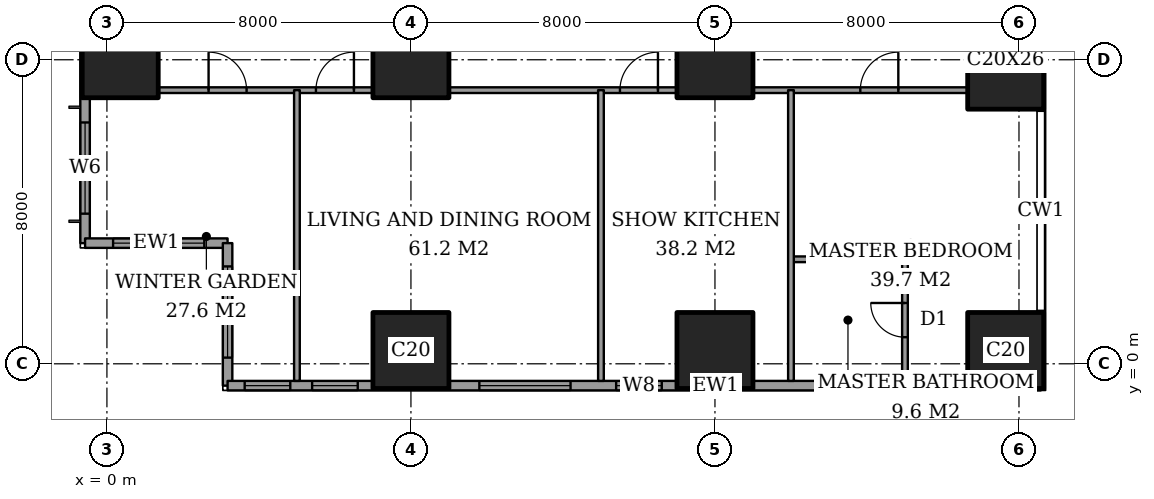
"""IFC4 building model, lengths in metres.
Left out: names, types, materials, properties, quantities, classifications, styles, units other than length and angle.
Written with IfcOpenShell. Run it as: python <this file> out.ifc"""

import sys

from ifc_helpers import new_model, si_unit, direction, frame, frame_2d, origin, origin_2d, place, context, subcontext, project, spatial, rectangle, extrude, element, fill, save


model = new_model("IFC4")
c1 = context("Model", 3, precision=1e-05, world=origin(), true_north=direction((0.0, 1.0)))
c2 = subcontext(c1, "Body", "Model", "MODEL_VIEW")
j1 = project(units=[si_unit("LENGTHUNIT", "METRE"), si_unit("PLANEANGLEUNIT", "RADIAN")], contexts=[c1])
p1 = place(None, origin())
s1 = spatial("IfcSite", under=j1, at=p1, CompositionType="ELEMENT")
p2 = place(p1, origin())
s2 = spatial("IfcBuilding", under=s1, at=p2, CompositionType="ELEMENT")
p3 = place(p2, frame((0.0, 0.0, 58.4)))
s3 = spatial("IfcBuildingStorey", under=s2, at=p3, CompositionType="ELEMENT", Elevation=58.4)
for number, where, z_axis, x_axis in (
    (1, (0.35, 8.0, 0.0), (0.0, 0.0, 1.0), (1.0, 0.0, 0.0)),
    (2, (8.0, 0.35, 0.0), (0.0, 0.0, 1.0), (1.0, 0.0, 0.0)),
    (3, (8.0, 8.0, 0.0), (0.0, 0.0, 1.0), (1.0, 0.0, 0.0)),
    (4, (16.0, 0.35, 0.0), (0.0, 0.0, 1.0), (1.0, 0.0, 0.0)),
    (5, (16.0, 8.0, 0.0), (0.0, 0.0, 1.0), (1.0, 0.0, 0.0)),
    (6, (23.65, 0.35, 0.0), (0.0, 0.0, 1.0), (1.0, 0.0, 0.0)),
):
    element("IfcColumn", number, at=place(p3, frame(where, z_axis=z_axis, x_axis=x_axis)), inside=s3, PredefinedType="COLUMN", context=c2, shape_type="SweptSolid", body=[
        extrude(rectangle(XDim=2.0, YDim=2.0, at=origin_2d()), origin(), (0.0, 0.0, 1.0), 3.6),
    ])
p4 = place(p3, frame((23.65, 8.0, 0.0), z_axis=(0.0, 0.0, 1.0), x_axis=(1.0, 0.0, 0.0)))
e7 = element("IfcColumn", 7, at=p4, inside=s3, PredefinedType="COLUMN", context=c2, shape_type="SweptSolid", body=[
    extrude(rectangle(XDim=2.0, YDim=2.6, at=origin_2d()), origin(), (0.0, 0.0, 1.0), 3.6),
])
p5 = place(p3, frame((-0.575, 44.825, 0.0), z_axis=(0.0, 0.0, 1.0), x_axis=(0.0, -1.0, 0.0)))
e8 = element("IfcWall", 8, at=p5, inside=s3, PredefinedType="SOLIDWALL", context=c2, shape_type="SweptSolid", body=[
    extrude(rectangle(XDim=41.65, YDim=0.25, at=frame_2d((20.825, 0.0))), origin(), (0.0, 0.0, 1.0), 3.6),
])
p6 = place(p5, frame((0.775, 0.0, 0.6)))
e9 = element("IfcOpeningElement", 9, at=p6, cuts=e8, PredefinedType="OPENING", context=c2, shape_type="SweptSolid", body=[
    extrude(rectangle(XDim=2.4, YDim=2.0, at=frame_2d((1.2, 1.0))), frame((0.0, 0.135, 0.0), z_axis=(0.0, -1.0, 0.0), x_axis=(1.0, 0.0, 0.0)), (0.0, 0.0, 1.0), 0.27),
])
p7 = place(p5, frame((6.1, 0.0, 0.6)))
e10 = element("IfcOpeningElement", 10, at=p7, cuts=e8, PredefinedType="OPENING", context=c2, shape_type="SweptSolid", body=[
    extrude(rectangle(XDim=1.2, YDim=2.0, at=frame_2d((0.6, 1.0))), frame((0.0, 0.135, 0.0), z_axis=(0.0, -1.0, 0.0), x_axis=(1.0, 0.0, 0.0)), (0.0, 0.0, 1.0), 0.27),
])
p8 = place(p5, frame((8.425, 0.0, 0.6)))
e11 = element("IfcOpeningElement", 11, at=p8, cuts=e8, PredefinedType="OPENING", context=c2, shape_type="SweptSolid", body=[
    extrude(rectangle(XDim=2.4, YDim=2.0, at=frame_2d((1.2, 1.0))), frame((0.0, 0.135, 0.0), z_axis=(0.0, -1.0, 0.0), x_axis=(1.0, 0.0, 0.0)), (0.0, 0.0, 1.0), 0.27),
])
p9 = place(p5, frame((15.625, 0.0, 0.6)))
e12 = element("IfcOpeningElement", 12, at=p9, cuts=e8, PredefinedType="OPENING", context=c2, shape_type="SweptSolid", body=[
    extrude(rectangle(XDim=2.4, YDim=2.0, at=frame_2d((1.2, 1.0))), frame((0.0, 0.135, 0.0), z_axis=(0.0, -1.0, 0.0), x_axis=(1.0, 0.0, 0.0)), (0.0, 0.0, 1.0), 0.27),
])
p10 = place(p5, frame((23.625, 0.0, 0.6)))
e13 = element("IfcOpeningElement", 13, at=p10, cuts=e8, PredefinedType="OPENING", context=c2, shape_type="SweptSolid", body=[
    extrude(rectangle(XDim=2.4, YDim=2.0, at=frame_2d((1.2, 1.0))), frame((0.0, 0.135, 0.0), z_axis=(0.0, -1.0, 0.0), x_axis=(1.0, 0.0, 0.0)), (0.0, 0.0, 1.0), 0.27),
])
p11 = place(p5, frame((30.825, 0.0, 0.6)))
e14 = element("IfcOpeningElement", 14, at=p11, cuts=e8, PredefinedType="OPENING", context=c2, shape_type="SweptSolid", body=[
    extrude(rectangle(XDim=2.4, YDim=2.0, at=frame_2d((1.2, 1.0))), frame((0.0, 0.135, 0.0), z_axis=(0.0, -1.0, 0.0), x_axis=(1.0, 0.0, 0.0)), (0.0, 0.0, 1.0), 0.27),
])
p12 = place(p5, frame((34.5, 0.0, 0.6)))
e15 = element("IfcOpeningElement", 15, at=p12, cuts=e8, PredefinedType="OPENING", context=c2, shape_type="SweptSolid", body=[
    extrude(rectangle(XDim=1.2, YDim=2.0, at=frame_2d((0.6, 1.0))), frame((0.0, 0.135, 0.0), z_axis=(0.0, -1.0, 0.0), x_axis=(1.0, 0.0, 0.0)), (0.0, 0.0, 1.0), 0.27),
])
p13 = place(p5, frame((38.475, 0.0, 0.6)))
e16 = element("IfcOpeningElement", 16, at=p13, cuts=e8, PredefinedType="OPENING", context=c2, shape_type="SweptSolid", body=[
    extrude(rectangle(XDim=2.4, YDim=2.0, at=frame_2d((1.2, 1.0))), frame((0.0, 0.135, 0.0), z_axis=(0.0, -1.0, 0.0), x_axis=(1.0, 0.0, 0.0)), (0.0, 0.0, 1.0), 0.27),
])
p14 = place(p3, frame((-0.575, 3.175, 0.0), z_axis=(0.0, 0.0, 1.0), x_axis=(1.0, 0.0, 0.0)))
e17 = element("IfcWall", 17, at=p14, inside=s3, PredefinedType="SOLIDWALL", context=c2, shape_type="SweptSolid", body=[
    extrude(rectangle(XDim=3.75, YDim=0.25, at=frame_2d((1.875, 0.0))), origin(), (0.0, 0.0, 1.0), 3.6),
])
p15 = place(p14, frame((0.738, 0.0, 0.6)))
e18 = element("IfcOpeningElement", 18, at=p15, cuts=e17, PredefinedType="OPENING", context=c2, shape_type="SweptSolid", body=[
    extrude(rectangle(XDim=2.4, YDim=2.0, at=frame_2d((1.2, 1.0))), frame((0.0, 0.135, 0.0), z_axis=(0.0, -1.0, 0.0), x_axis=(1.0, 0.0, 0.0)), (0.0, 0.0, 1.0), 0.27),
])
p16 = place(p3, frame((3.175, 3.175, 0.0), z_axis=(0.0, 0.0, 1.0), x_axis=(0.0, -1.0, 0.0)))
e19 = element("IfcWall", 19, at=p16, inside=s3, PredefinedType="SOLIDWALL", context=c2, shape_type="SweptSolid", body=[
    extrude(rectangle(XDim=3.75, YDim=0.25, at=frame_2d((1.875, 0.0))), origin(), (0.0, 0.0, 1.0), 3.6),
])
p17 = place(p16, frame((0.613, 0.0, 0.6)))
e20 = element("IfcOpeningElement", 20, at=p17, cuts=e19, PredefinedType="OPENING", context=c2, shape_type="SweptSolid", body=[
    extrude(rectangle(XDim=2.4, YDim=2.0, at=frame_2d((1.2, 1.0))), frame((0.0, 0.135, 0.0), z_axis=(0.0, -1.0, 0.0), x_axis=(1.0, 0.0, 0.0)), (0.0, 0.0, 1.0), 0.27),
])
p18 = place(p3, frame((3.175, -0.575, 0.0), z_axis=(0.0, 0.0, 1.0), x_axis=(1.0, 0.0, 0.0)))
e21 = element("IfcWall", 21, at=p18, inside=s3, PredefinedType="SOLIDWALL", context=c2, shape_type="SweptSolid", body=[
    extrude(rectangle(XDim=21.4, YDim=0.25, at=frame_2d((10.7, 0.0))), origin(), (0.0, 0.0, 1.0), 3.6),
])
p19 = place(p18, frame((0.45, 0.0, 0.6)))
e22 = element("IfcOpeningElement", 22, at=p19, cuts=e21, PredefinedType="OPENING", context=c2, shape_type="SweptSolid", body=[
    extrude(rectangle(XDim=1.2, YDim=2.0, at=frame_2d((0.6, 1.0))), frame((0.0, 0.135, 0.0), z_axis=(0.0, -1.0, 0.0), x_axis=(1.0, 0.0, 0.0)), (0.0, 0.0, 1.0), 0.27),
])
p20 = place(p18, frame((2.225, 0.0, 0.6)))
e23 = element("IfcOpeningElement", 23, at=p20, cuts=e21, PredefinedType="OPENING", context=c2, shape_type="SweptSolid", body=[
    extrude(rectangle(XDim=1.2, YDim=2.0, at=frame_2d((0.6, 1.0))), frame((0.0, 0.135, 0.0), z_axis=(0.0, -1.0, 0.0), x_axis=(1.0, 0.0, 0.0)), (0.0, 0.0, 1.0), 0.27),
])
p21 = place(p18, frame((6.625, 0.0, 0.6)))
e24 = element("IfcOpeningElement", 24, at=p21, cuts=e21, PredefinedType="OPENING", context=c2, shape_type="SweptSolid", body=[
    extrude(rectangle(XDim=2.4, YDim=2.0, at=frame_2d((1.2, 1.0))), frame((0.0, 0.135, 0.0), z_axis=(0.0, -1.0, 0.0), x_axis=(1.0, 0.0, 0.0)), (0.0, 0.0, 1.0), 0.27),
])
p22 = place(p18, frame((10.225, 0.0, 0.6)))
e25 = element("IfcOpeningElement", 25, at=p22, cuts=e21, PredefinedType="OPENING", context=c2, shape_type="SweptSolid", body=[
    extrude(rectangle(XDim=1.2, YDim=2.0, at=frame_2d((0.6, 1.0))), frame((0.0, 0.135, 0.0), z_axis=(0.0, -1.0, 0.0), x_axis=(1.0, 0.0, 0.0)), (0.0, 0.0, 1.0), 0.27),
])
p23 = place(p18, frame((15.725, 0.0, 0.6)))
e26 = element("IfcOpeningElement", 26, at=p23, cuts=e21, PredefinedType="OPENING", context=c2, shape_type="SweptSolid", body=[
    extrude(rectangle(XDim=1.2, YDim=2.0, at=frame_2d((0.6, 1.0))), frame((0.0, 0.135, 0.0), z_axis=(0.0, -1.0, 0.0), x_axis=(1.0, 0.0, 0.0)), (0.0, 0.0, 1.0), 0.27),
])
p24 = place(p18, frame((18.125, 0.0, 0.6)))
e27 = element("IfcOpeningElement", 27, at=p24, cuts=e21, PredefinedType="OPENING", context=c2, shape_type="SweptSolid", body=[
    extrude(rectangle(XDim=1.2, YDim=2.0, at=frame_2d((0.6, 1.0))), frame((0.0, 0.135, 0.0), z_axis=(0.0, -1.0, 0.0), x_axis=(1.0, 0.0, 0.0)), (0.0, 0.0, 1.0), 0.27),
])
p25 = place(p3, frame((18.0, 2.75, 0.0), z_axis=(0.0, 0.0, 1.0), x_axis=(1.0, 0.0, 0.0)))
e28 = element("IfcWall", 28, at=p25, inside=s3, PredefinedType="PARTITIONING", context=c2, shape_type="SweptSolid", body=[
    extrude(rectangle(XDim=3.0, YDim=0.15, at=frame_2d((1.5, 0.0))), origin(), (0.0, 0.0, 1.0), 3.35),
])
p26 = place(p3, frame((1.35, 7.2, 0.0), z_axis=(0.0, 0.0, 1.0), x_axis=(1.0, 0.0, 0.0)))
e29 = element("IfcWall", 29, at=p26, inside=s3, PredefinedType="PARTITIONING", context=c2, shape_type="SweptSolid", body=[
    extrude(rectangle(XDim=5.65, YDim=0.15, at=frame_2d((2.825, 0.0))), origin(), (0.0, 0.0, 1.0), 3.35),
])
p27 = place(p26, frame((1.325, 0.0, 0.0)))
e30 = element("IfcOpeningElement", 30, at=p27, cuts=e29, PredefinedType="OPENING", context=c2, shape_type="SweptSolid", body=[
    extrude(rectangle(XDim=1.0, YDim=2.1, at=frame_2d((0.5, 1.05))), frame((0.0, 0.085, 0.0), z_axis=(0.0, -1.0, 0.0), x_axis=(1.0, 0.0, 0.0)), (0.0, 0.0, 1.0), 0.17),
])
p28 = place(p26, frame((4.15, 0.0, 0.0)))
e31 = element("IfcOpeningElement", 31, at=p28, cuts=e29, PredefinedType="OPENING", context=c2, shape_type="SweptSolid", body=[
    extrude(rectangle(XDim=1.0, YDim=2.1, at=frame_2d((0.5, 1.05))), frame((0.0, 0.085, 0.0), z_axis=(0.0, -1.0, 0.0), x_axis=(1.0, 0.0, 0.0)), (0.0, 0.0, 1.0), 0.17),
])
p29 = place(p3, frame((9.0, 7.2, 0.0), z_axis=(0.0, 0.0, 1.0), x_axis=(1.0, 0.0, 0.0)))
e32 = element("IfcWall", 32, at=p29, inside=s3, PredefinedType="PARTITIONING", context=c2, shape_type="SweptSolid", body=[
    extrude(rectangle(XDim=6.0, YDim=0.15, at=frame_2d((3.0, 0.0))), origin(), (0.0, 0.0, 1.0), 3.35),
])
p30 = place(p29, frame((4.5, 0.0, 0.0)))
e33 = element("IfcOpeningElement", 33, at=p30, cuts=e32, PredefinedType="OPENING", context=c2, shape_type="SweptSolid", body=[
    extrude(rectangle(XDim=1.0, YDim=2.1, at=frame_2d((0.5, 1.05))), frame((0.0, 0.085, 0.0), z_axis=(0.0, -1.0, 0.0), x_axis=(1.0, 0.0, 0.0)), (0.0, 0.0, 1.0), 0.17),
])
p31 = place(p3, frame((17.0, 7.2, 0.0), z_axis=(0.0, 0.0, 1.0), x_axis=(1.0, 0.0, 0.0)))
e34 = element("IfcWall", 34, at=p31, inside=s3, PredefinedType="PARTITIONING", context=c2, shape_type="SweptSolid", body=[
    extrude(rectangle(XDim=5.65, YDim=0.15, at=frame_2d((2.825, 0.0))), origin(), (0.0, 0.0, 1.0), 3.35),
])
p32 = place(p31, frame((2.825, 0.0, 0.0)))
e35 = element("IfcOpeningElement", 35, at=p32, cuts=e34, PredefinedType="OPENING", context=c2, shape_type="SweptSolid", body=[
    extrude(rectangle(XDim=1.0, YDim=2.1, at=frame_2d((0.5, 1.05))), frame((0.0, 0.085, 0.0), z_axis=(0.0, -1.0, 0.0), x_axis=(1.0, 0.0, 0.0)), (0.0, 0.0, 1.0), 0.17),
])
for number, where, z_axis, x_axis in (
    (36, (5.0, -0.45, 0.0), (0.0, 0.0, 1.0), (0.0, 1.0, 0.0)),
    (37, (13.0, -0.45, 0.0), (0.0, 0.0, 1.0), (0.0, 1.0, 0.0)),
    (38, (18.0, -0.45, 0.0), (0.0, 0.0, 1.0), (0.0, 1.0, 0.0)),
):
    element("IfcWall", number, at=place(p3, frame(where, z_axis=z_axis, x_axis=x_axis)), inside=s3, PredefinedType="PARTITIONING", context=c2, shape_type="SweptSolid", body=[
        extrude(rectangle(XDim=7.65, YDim=0.15, at=frame_2d((3.825, 0.0))), origin(), (0.0, 0.0, 1.0), 3.35),
    ])
p33 = place(p3, frame((21.0, -0.45, 0.0), z_axis=(0.0, 0.0, 1.0), x_axis=(0.0, 1.0, 0.0)))
e39 = element("IfcWall", 39, at=p33, inside=s3, PredefinedType="PARTITIONING", context=c2, shape_type="SweptSolid", body=[
    extrude(rectangle(XDim=3.2, YDim=0.15, at=frame_2d((1.6, 0.0))), origin(), (0.0, 0.0, 1.0), 3.35),
])
p34 = place(p33, frame((1.15, 0.0, 0.0)))
e40 = element("IfcOpeningElement", 40, at=p34, cuts=e39, PredefinedType="OPENING", context=c2, shape_type="SweptSolid", body=[
    extrude(rectangle(XDim=0.9, YDim=2.1, at=frame_2d((0.45, 1.05))), frame((0.0, 0.085, 0.0), z_axis=(0.0, -1.0, 0.0), x_axis=(1.0, 0.0, 0.0)), (0.0, 0.0, 1.0), 0.17),
])
p35 = place(p13, origin())
e41 = element("IfcWindow", 41, at=p35, inside=s3, PartitioningType="SINGLE_PANEL", PredefinedType="WINDOW", context=c2, shape_type="SweptSolid", body=[
    extrude(rectangle(XDim=2.4, YDim=2.0, at=frame_2d((1.2, 1.0))), frame((0.0, 0.03, 0.0), z_axis=(0.0, -1.0, 0.0), x_axis=(1.0, 0.0, 0.0)), (0.0, 0.0, 1.0), 0.06),
])
fill(e16, e41)
p36 = place(p15, origin())
e42 = element("IfcWindow", 42, at=p36, inside=s3, PartitioningType="SINGLE_PANEL", PredefinedType="WINDOW", context=c2, shape_type="SweptSolid", body=[
    extrude(rectangle(XDim=2.4, YDim=2.0, at=frame_2d((1.2, 1.0))), frame((0.0, 0.03, 0.0), z_axis=(0.0, -1.0, 0.0), x_axis=(1.0, 0.0, 0.0)), (0.0, 0.0, 1.0), 0.06),
])
fill(e18, e42)
p37 = place(p17, origin())
e43 = element("IfcWindow", 43, at=p37, inside=s3, PartitioningType="SINGLE_PANEL", PredefinedType="WINDOW", context=c2, shape_type="SweptSolid", body=[
    extrude(rectangle(XDim=2.4, YDim=2.0, at=frame_2d((1.2, 1.0))), frame((0.0, 0.03, 0.0), z_axis=(0.0, -1.0, 0.0), x_axis=(1.0, 0.0, 0.0)), (0.0, 0.0, 1.0), 0.06),
])
fill(e20, e43)
p38 = place(p19, origin())
e44 = element("IfcWindow", 44, at=p38, inside=s3, PartitioningType="SINGLE_PANEL", PredefinedType="WINDOW", context=c2, shape_type="SweptSolid", body=[
    extrude(rectangle(XDim=1.2, YDim=2.0, at=frame_2d((0.6, 1.0))), frame((0.0, 0.03, 0.0), z_axis=(0.0, -1.0, 0.0), x_axis=(1.0, 0.0, 0.0)), (0.0, 0.0, 1.0), 0.06),
])
fill(e22, e44)
p39 = place(p20, origin())
e45 = element("IfcWindow", 45, at=p39, inside=s3, PartitioningType="SINGLE_PANEL", PredefinedType="WINDOW", context=c2, shape_type="SweptSolid", body=[
    extrude(rectangle(XDim=1.2, YDim=2.0, at=frame_2d((0.6, 1.0))), frame((0.0, 0.03, 0.0), z_axis=(0.0, -1.0, 0.0), x_axis=(1.0, 0.0, 0.0)), (0.0, 0.0, 1.0), 0.06),
])
fill(e23, e45)
p40 = place(p21, origin())
e46 = element("IfcWindow", 46, at=p40, inside=s3, PartitioningType="SINGLE_PANEL", PredefinedType="WINDOW", context=c2, shape_type="SweptSolid", body=[
    extrude(rectangle(XDim=2.4, YDim=2.0, at=frame_2d((1.2, 1.0))), frame((0.0, 0.03, 0.0), z_axis=(0.0, -1.0, 0.0), x_axis=(1.0, 0.0, 0.0)), (0.0, 0.0, 1.0), 0.06),
])
fill(e24, e46)
p41 = place(p22, origin())
e47 = element("IfcWindow", 47, at=p41, inside=s3, PartitioningType="SINGLE_PANEL", PredefinedType="WINDOW", context=c2, shape_type="SweptSolid", body=[
    extrude(rectangle(XDim=1.2, YDim=2.0, at=frame_2d((0.6, 1.0))), frame((0.0, 0.03, 0.0), z_axis=(0.0, -1.0, 0.0), x_axis=(1.0, 0.0, 0.0)), (0.0, 0.0, 1.0), 0.06),
])
fill(e25, e47)
p42 = place(p23, origin())
e48 = element("IfcWindow", 48, at=p42, inside=s3, PartitioningType="SINGLE_PANEL", PredefinedType="WINDOW", context=c2, shape_type="SweptSolid", body=[
    extrude(rectangle(XDim=1.2, YDim=2.0, at=frame_2d((0.6, 1.0))), frame((0.0, 0.03, 0.0), z_axis=(0.0, -1.0, 0.0), x_axis=(1.0, 0.0, 0.0)), (0.0, 0.0, 1.0), 0.06),
])
fill(e26, e48)
p43 = place(p24, origin())
e49 = element("IfcWindow", 49, at=p43, inside=s3, PartitioningType="SINGLE_PANEL", PredefinedType="WINDOW", context=c2, shape_type="SweptSolid", body=[
    extrude(rectangle(XDim=1.2, YDim=2.0, at=frame_2d((0.6, 1.0))), frame((0.0, 0.03, 0.0), z_axis=(0.0, -1.0, 0.0), x_axis=(1.0, 0.0, 0.0)), (0.0, 0.0, 1.0), 0.06),
])
fill(e27, e49)
p44 = place(p27, origin())
e50 = element("IfcDoor", 50, at=p44, inside=s3, OperationType="SINGLE_SWING_RIGHT", PredefinedType="DOOR", context=c2, shape_type="SweptSolid", body=[
    extrude(rectangle(XDim=1.0, YDim=2.1, at=frame_2d((0.5, 1.05))), frame((0.0, 0.025, 0.0), z_axis=(0.0, -1.0, 0.0), x_axis=(1.0, 0.0, 0.0)), (0.0, 0.0, 1.0), 0.05),
])
fill(e30, e50)
p45 = place(p28, origin())
e51 = element("IfcDoor", 51, at=p45, inside=s3, OperationType="SINGLE_SWING_LEFT", PredefinedType="DOOR", context=c2, shape_type="SweptSolid", body=[
    extrude(rectangle(XDim=1.0, YDim=2.1, at=frame_2d((0.5, 1.05))), frame((0.0, 0.025, 0.0), z_axis=(0.0, -1.0, 0.0), x_axis=(1.0, 0.0, 0.0)), (0.0, 0.0, 1.0), 0.05),
])
fill(e31, e51)
p46 = place(p30, origin())
e52 = element("IfcDoor", 52, at=p46, inside=s3, OperationType="SINGLE_SWING_LEFT", PredefinedType="DOOR", context=c2, shape_type="SweptSolid", body=[
    extrude(rectangle(XDim=1.0, YDim=2.1, at=frame_2d((0.5, 1.05))), frame((0.0, 0.025, 0.0), z_axis=(0.0, -1.0, 0.0), x_axis=(1.0, 0.0, 0.0)), (0.0, 0.0, 1.0), 0.05),
])
fill(e33, e52)
p47 = place(p34, origin())
e53 = element("IfcDoor", 53, at=p47, inside=s3, OperationType="SINGLE_SWING_LEFT", PredefinedType="DOOR", context=c2, shape_type="SweptSolid", body=[
    extrude(rectangle(XDim=0.9, YDim=2.1, at=frame_2d((0.45, 1.05))), frame((0.0, 0.025, 0.0), z_axis=(0.0, -1.0, 0.0), x_axis=(1.0, 0.0, 0.0)), (0.0, 0.0, 1.0), 0.05),
])
fill(e40, e53)
p48 = place(p32, origin())
e54 = element("IfcDoor", 54, at=p48, inside=s3, OperationType="SINGLE_SWING_LEFT", PredefinedType="DOOR", context=c2, shape_type="SweptSolid", body=[
    extrude(rectangle(XDim=1.0, YDim=2.1, at=frame_2d((0.5, 1.05))), frame((0.0, 0.025, 0.0), z_axis=(0.0, -1.0, 0.0), x_axis=(1.0, 0.0, 0.0)), (0.0, 0.0, 1.0), 0.05),
])
fill(e35, e54)
save(model, sys.argv[1])
